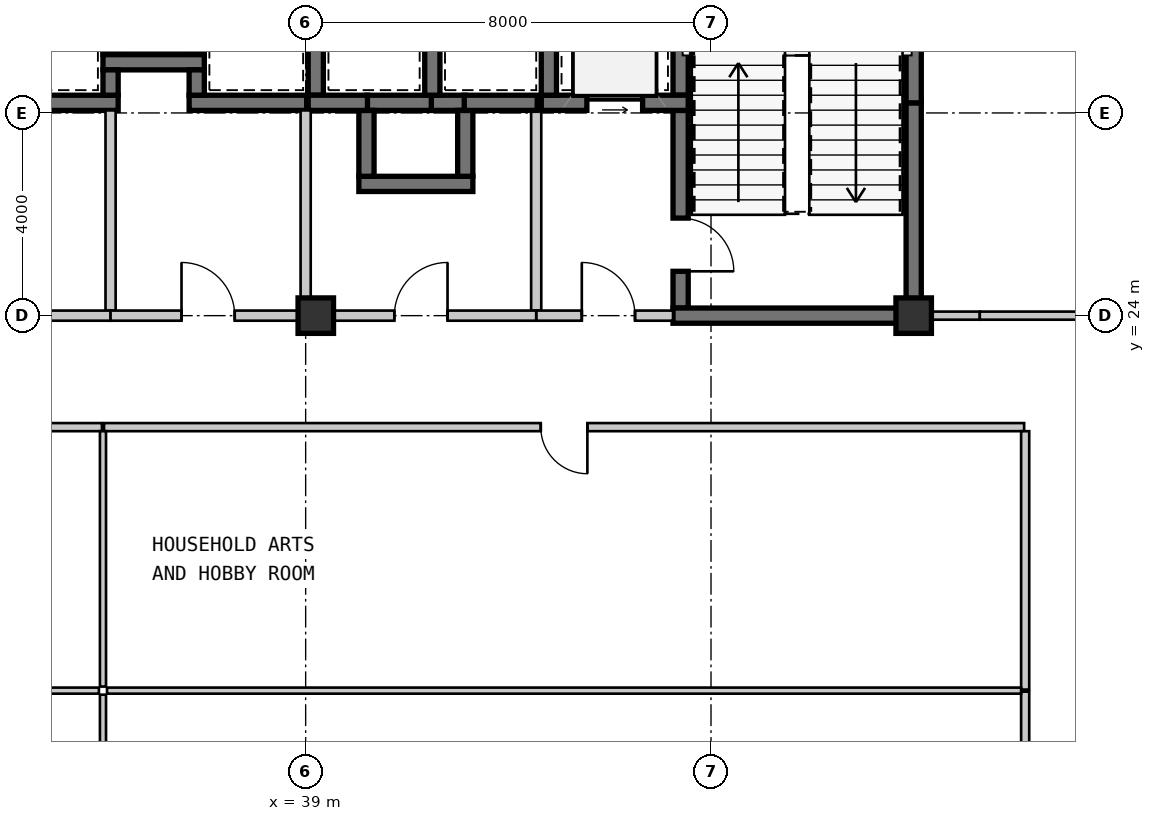
"""IFC4 building model, lengths in metres.
Left out: names, types, materials, properties, quantities, classifications, styles, units other than length and angle.
Written with IfcOpenShell. Run it as: python <this file> out.ifc"""

import sys

from ifc_helpers import new_model, si_unit, direction, frame, frame_2d, origin, origin_2d, place, context, subcontext, project, spatial, rectangle, extrude, source, transform, mapped, element, fill, save


model = new_model("IFC4")
c1 = context("Model", 3, precision=1e-05, world=origin(), true_north=direction((0.0, 1.0)))
c2 = subcontext(c1, "Body", "Model", "MODEL_VIEW")
j1 = project(units=[si_unit("LENGTHUNIT", "METRE"), si_unit("PLANEANGLEUNIT", "RADIAN")], contexts=[c1])
p1 = place(None, origin())
s1 = spatial("IfcSite", under=j1, at=p1, CompositionType="ELEMENT")
p2 = place(p1, origin())
s2 = spatial("IfcBuilding", under=s1, at=p2, CompositionType="ELEMENT")
p3 = place(p2, frame((0.0, 0.0, 74.55)))
s3 = spatial("IfcBuildingStorey", under=s2, at=p3, CompositionType="ELEMENT", Elevation=74.55)
m1 = source(origin(), c2, "Body", "SweptSolid", [
    extrude(rectangle(XDim=0.7, YDim=0.7, at=origin_2d()), origin(), (0.0, 0.0, 1.0), 3.15),
])
for number, where, z_axis, x_axis in (
    (1, (39.2, 24.0, 0.0), (0.0, 0.0, 1.0), (1.0, 0.0, 0.0)),
    (2, (51.0, 24.0, 0.0), (0.0, 0.0, 1.0), (1.0, 0.0, 0.0)),
):
    element("IfcColumn", number, at=place(p3, frame(where, z_axis=z_axis, x_axis=x_axis)), inside=s3, PredefinedType="COLUMN", context=c2, shape_type="MappedRepresentation", body=[
        mapped(m1, transform((0.0, 0.0, 0.0), scale=1.0)),
    ])
m2 = source(origin(), c2, "Body", "SweptSolid", [
    extrude(rectangle(XDim=4.05, YDim=0.3, at=frame_2d((2.025, 0.0))), origin(), (0.0, 0.0, 1.0), 2.93),
])
p4 = place(p3, frame((51.0, 24.15, 0.0), z_axis=(0.0, 0.0, 1.0), x_axis=(0.0, 1.0, 0.0)))
e3 = element("IfcWall", 3, at=p4, inside=s3, PredefinedType="SHEAR", context=c2, shape_type="MappedRepresentation", body=[
    mapped(m2, transform((0.0, 0.0, 0.0), scale=1.0)),
])
m3 = source(origin(), c2, "Body", "SweptSolid", [
    extrude(rectangle(XDim=3.65, YDim=0.3, at=frame_2d((1.825, 0.0))), origin(), (0.0, 0.0, 1.0), 2.93),
])
p5 = place(p3, frame((51.0, 28.2, 0.0), z_axis=(0.0, 0.0, 1.0), x_axis=(0.0, 1.0, 0.0)))
e4 = element("IfcWall", 4, at=p5, inside=s3, PredefinedType="SHEAR", context=c2, shape_type="MappedRepresentation", body=[
    mapped(m3, transform((0.0, 0.0, 0.0), scale=1.0)),
])
m4 = source(origin(), c2, "Body", "SweptSolid", [
    extrude(rectangle(XDim=3.5, YDim=0.3, at=frame_2d((1.75, 0.0))), origin(), (0.0, 0.0, 1.0), 2.93),
])
p6 = place(p3, frame((46.4, 31.85, 0.0), z_axis=(0.0, 0.0, 1.0), x_axis=(0.0, -1.0, 0.0)))
e5 = element("IfcWall", 5, at=p6, inside=s3, PredefinedType="SHEAR", context=c2, shape_type="MappedRepresentation", body=[
    mapped(m4, transform((0.0, 0.0, 0.0), scale=1.0)),
])
m5 = source(origin(), c2, "Body", "SweptSolid", [
    extrude(rectangle(XDim=3.9, YDim=0.3, at=frame_2d((1.95, 0.0))), origin(), (0.0, 0.0, 1.0), 2.93),
])
p7 = place(p3, frame((46.4, 28.05, 0.0), z_axis=(0.0, 0.0, 1.0), x_axis=(0.0, -1.0, 0.0)))
e6 = element("IfcWall", 6, at=p7, inside=s3, PredefinedType="SHEAR", context=c2, shape_type="MappedRepresentation", body=[
    mapped(m5, transform((0.0, 0.0, 0.0), scale=1.0)),
])
m6 = source(origin(), c2, "Body", "SweptSolid", [
    extrude(rectangle(XDim=1.05, YDim=2.1, at=frame_2d((0.525, 1.05))), frame((0.0, 0.16, 0.0), z_axis=(0.0, -1.0, 0.0), x_axis=(1.0, 0.0, 0.0)), (0.0, 0.0, 1.0), 0.32),
])
p8 = place(p7, frame((2.125, 0.0, 0.0)))
e7 = element("IfcOpeningElement", 7, at=p8, cuts=e6, PredefinedType="OPENING", context=c2, shape_type="MappedRepresentation", body=[
    mapped(m6, transform((0.0, 0.0, 0.0), scale=1.0)),
])
m7 = source(origin(), c2, "Body", "SweptSolid", [
    extrude(rectangle(XDim=4.9, YDim=0.3, at=frame_2d((2.45, 0.0))), origin(), (0.0, 0.0, 1.0), 2.93),
])
p9 = place(p3, frame((46.25, 24.0, 0.0), z_axis=(0.0, 0.0, 1.0), x_axis=(1.0, 0.0, 0.0)))
e8 = element("IfcWall", 8, at=p9, inside=s3, PredefinedType="SHEAR", context=c2, shape_type="MappedRepresentation", body=[
    mapped(m7, transform((0.0, 0.0, 0.0), scale=1.0)),
])
m8 = source(origin(), c2, "Body", "SweptSolid", [
    extrude(rectangle(XDim=2.9, YDim=0.3, at=frame_2d((1.45, 0.0))), origin(), (0.0, 0.0, 1.0), 2.93),
])
p10 = place(p3, frame((43.65, 28.2, 0.0), z_axis=(0.0, 0.0, 1.0), x_axis=(1.0, 0.0, 0.0)))
e9 = element("IfcWall", 9, at=p10, inside=s3, PredefinedType="SHEAR", context=c2, shape_type="MappedRepresentation", body=[
    mapped(m8, transform((0.0, 0.0, 0.0), scale=1.0)),
])
m9 = source(origin(), c2, "Body", "SweptSolid", [
    extrude(rectangle(XDim=1.1, YDim=2.15, at=frame_2d((0.55, 1.075))), frame((0.0, 0.16, 0.0), z_axis=(0.0, -1.0, 0.0), x_axis=(1.0, 0.0, 0.0)), (0.0, 0.0, 1.0), 0.32),
])
p11 = place(p10, frame((0.9, 0.0, 0.0)))
e10 = element("IfcOpeningElement", 10, at=p11, cuts=e9, PredefinedType="OPENING", context=c2, shape_type="MappedRepresentation", body=[
    mapped(m9, transform((0.0, 0.0, 0.0), scale=1.0)),
])
p12 = place(p3, frame((43.8, 31.85, 0.0), z_axis=(0.0, 0.0, 1.0), x_axis=(0.0, -1.0, 0.0)))
e11 = element("IfcWall", 11, at=p12, inside=s3, PredefinedType="SHEAR", context=c2, shape_type="MappedRepresentation", body=[
    mapped(m4, transform((0.0, 0.0, 0.0), scale=1.0)),
])
m10 = source(origin(), c2, "Body", "SweptSolid", [
    extrude(rectangle(XDim=3.95, YDim=0.2, at=frame_2d((1.975, 0.0))), origin(), (0.0, 0.0, 1.0), 2.93),
])
p13 = place(p3, frame((43.55, 28.05, 0.0), z_axis=(0.0, 0.0, 1.0), x_axis=(0.0, -1.0, 0.0)))
e12 = element("IfcWall", 12, at=p13, inside=s3, PredefinedType="SOLIDWALL", context=c2, shape_type="MappedRepresentation", body=[
    mapped(m10, transform((0.0, 0.0, 0.0), scale=1.0)),
])
m11 = source(origin(), c2, "Body", "SweptSolid", [
    extrude(rectangle(XDim=2.7, YDim=0.2, at=frame_2d((1.35, 0.0))), origin(), (0.0, 0.0, 1.0), 2.397),
])
p14 = place(p3, frame((43.55, 24.0, 0.0), z_axis=(0.0, 0.0, 1.0), x_axis=(1.0, 0.0, 0.0)))
e13 = element("IfcWall", 13, at=p14, inside=s3, PredefinedType="SOLIDWALL", context=c2, shape_type="MappedRepresentation", body=[
    mapped(m11, transform((0.0, 0.0, 0.0), scale=1.0)),
])
m12 = source(origin(), c2, "Body", "SweptSolid", [
    extrude(rectangle(XDim=1.05, YDim=2.1, at=frame_2d((0.525, 1.05))), frame((0.0, 0.11, 0.0), z_axis=(0.0, -1.0, 0.0), x_axis=(1.0, 0.0, 0.0)), (0.0, 0.0, 1.0), 0.22),
])
p15 = place(p14, frame((0.9, 0.0, 0.0)))
e14 = element("IfcOpeningElement", 14, at=p15, cuts=e13, PredefinedType="OPENING", context=c2, shape_type="MappedRepresentation", body=[
    mapped(m12, transform((0.0, 0.0, 0.0), scale=1.0)),
])
m13 = source(origin(), c2, "Body", "SweptSolid", [
    extrude(rectangle(XDim=1.2, YDim=0.3, at=frame_2d((0.6, 0.0))), origin(), (0.0, 0.0, 1.0), 2.93),
])
for number, where, z_axis, x_axis in (
    (15, (35.15, 30.35, 0.0), (0.0, 0.0, 1.0), (0.0, -1.0, 0.0)),
    (16, (36.85, 29.15, 0.0), (0.0, 0.0, 1.0), (0.0, 1.0, 0.0)),
):
    element("IfcWall", number, at=place(p3, frame(where, z_axis=z_axis, x_axis=x_axis)), inside=s3, PredefinedType="SHEAR", context=c2, shape_type="MappedRepresentation", body=[
        mapped(m13, transform((0.0, 0.0, 0.0), scale=1.0)),
    ])
m14 = source(origin(), c2, "Body", "SweptSolid", [
    extrude(rectangle(XDim=2.0, YDim=0.3, at=frame_2d((1.0, 0.0))), origin(), (0.0, 0.0, 1.0), 2.93),
])
p16 = place(p3, frame((35.0, 29.0, 0.0), z_axis=(0.0, 0.0, 1.0), x_axis=(1.0, 0.0, 0.0)))
e17 = element("IfcWall", 17, at=p16, inside=s3, PredefinedType="SHEAR", context=c2, shape_type="MappedRepresentation", body=[
    mapped(m14, transform((0.0, 0.0, 0.0), scale=1.0)),
])
m15 = source(origin(), c2, "Body", "SweptSolid", [
    extrude(rectangle(XDim=1.32, YDim=0.3, at=frame_2d((0.66, 0.0))), origin(), (0.0, 0.0, 1.0), 2.93),
])
p17 = place(p3, frame((41.52, 28.2, 0.0), z_axis=(0.0, 0.0, 1.0), x_axis=(-1.0, 0.0, 0.0)))
e18 = element("IfcWall", 18, at=p17, inside=s3, PredefinedType="SHEAR", context=c2, shape_type="MappedRepresentation", body=[
    mapped(m15, transform((0.0, 0.0, 0.0), scale=1.0)),
])
m16 = source(origin(), c2, "Body", "SweptSolid", [
    extrude(rectangle(XDim=0.67, YDim=0.3, at=frame_2d((0.335, 0.0))), origin(), (0.0, 0.0, 1.0), 2.93),
])
p18 = place(p3, frame((42.15, 28.2, 0.0), z_axis=(0.0, 0.0, 1.0), x_axis=(-1.0, 0.0, 0.0)))
e19 = element("IfcWall", 19, at=p18, inside=s3, PredefinedType="SHEAR", context=c2, shape_type="MappedRepresentation", body=[
    mapped(m16, transform((0.0, 0.0, 0.0), scale=1.0)),
])
m17 = source(origin(), c2, "Body", "SweptSolid", [
    extrude(rectangle(XDim=2.25, YDim=0.3, at=frame_2d((1.125, 0.0))), origin(), (0.0, 0.0, 1.0), 2.93),
])
p19 = place(p3, frame((40.05, 26.6, 0.0), z_axis=(0.0, 0.0, 1.0), x_axis=(1.0, 0.0, 0.0)))
e20 = element("IfcWall", 20, at=p19, inside=s3, PredefinedType="SHEAR", context=c2, shape_type="MappedRepresentation", body=[
    mapped(m17, transform((0.0, 0.0, 0.0), scale=1.0)),
])
m18 = source(origin(), c2, "Body", "SweptSolid", [
    extrude(rectangle(XDim=1.3, YDim=0.3, at=frame_2d((0.65, 0.0))), origin(), (0.0, 0.0, 1.0), 2.93),
])
for number, where, z_axis, x_axis in (
    (21, (40.2, 28.05, 0.0), (0.0, 0.0, 1.0), (0.0, -1.0, 0.0)),
    (22, (42.15, 26.75, 0.0), (0.0, 0.0, 1.0), (0.0, 1.0, 0.0)),
):
    element("IfcWall", number, at=place(p3, frame(where, z_axis=z_axis, x_axis=x_axis)), inside=s3, PredefinedType="SHEAR", context=c2, shape_type="MappedRepresentation", body=[
        mapped(m18, transform((0.0, 0.0, 0.0), scale=1.0)),
    ])
m19 = source(origin(), c2, "Body", "SweptSolid", [
    extrude(rectangle(XDim=2.6, YDim=0.3, at=frame_2d((1.3, 0.0))), origin(), (0.0, 0.0, 1.0), 2.93),
])
p20 = place(p3, frame((32.7, 28.2, 0.0), z_axis=(0.0, 0.0, 1.0), x_axis=(1.0, 0.0, 0.0)))
e23 = element("IfcWall", 23, at=p20, inside=s3, PredefinedType="SHEAR", context=c2, shape_type="MappedRepresentation", body=[
    mapped(m19, transform((0.0, 0.0, 0.0), scale=1.0)),
])
m20 = source(origin(), c2, "Body", "SweptSolid", [
    extrude(rectangle(XDim=0.5, YDim=0.3, at=frame_2d((0.25, 0.0))), origin(), (0.0, 0.0, 1.0), 2.93),
])
p21 = place(p3, frame((35.15, 28.35, 0.0), z_axis=(0.0, 0.0, 1.0), x_axis=(0.0, 1.0, 0.0)))
e24 = element("IfcWall", 24, at=p21, inside=s3, PredefinedType="SHEAR", context=c2, shape_type="MappedRepresentation", body=[
    mapped(m20, transform((0.0, 0.0, 0.0), scale=1.0)),
])
p22 = place(p3, frame((39.2, 28.35, 0.0), z_axis=(0.0, 0.0, 1.0), x_axis=(0.0, 1.0, 0.0)))
e25 = element("IfcWall", 25, at=p22, inside=s3, PredefinedType="SHEAR", context=c2, shape_type="MappedRepresentation", body=[
    mapped(m4, transform((0.0, 0.0, 0.0), scale=1.0)),
])
m21 = source(origin(), c2, "Body", "SweptSolid", [
    extrude(rectangle(XDim=2.32, YDim=0.3, at=frame_2d((1.16, 0.0))), origin(), (0.0, 0.0, 1.0), 2.93),
])
p23 = place(p3, frame((36.7, 28.2, 0.0), z_axis=(0.0, 0.0, 1.0), x_axis=(1.0, 0.0, 0.0)))
e26 = element("IfcWall", 26, at=p23, inside=s3, PredefinedType="SHEAR", context=c2, shape_type="MappedRepresentation", body=[
    mapped(m21, transform((0.0, 0.0, 0.0), scale=1.0)),
])
p24 = place(p3, frame((36.85, 28.85, 0.0), z_axis=(0.0, 0.0, 1.0), x_axis=(0.0, -1.0, 0.0)))
e27 = element("IfcWall", 27, at=p24, inside=s3, PredefinedType="SHEAR", context=c2, shape_type="MappedRepresentation", body=[
    mapped(m20, transform((0.0, 0.0, 0.0), scale=1.0)),
])
p25 = place(p3, frame((41.5, 28.35, 0.0), z_axis=(0.0, 0.0, 1.0), x_axis=(0.0, 1.0, 0.0)))
e28 = element("IfcWall", 28, at=p25, inside=s3, PredefinedType="SHEAR", context=c2, shape_type="MappedRepresentation", body=[
    mapped(m4, transform((0.0, 0.0, 0.0), scale=1.0)),
])
m22 = source(origin(), c2, "Body", "SweptSolid", [
    extrude(rectangle(XDim=1.17, YDim=0.3, at=frame_2d((0.585, 0.0))), origin(), (0.0, 0.0, 1.0), 2.93),
])
p26 = place(p3, frame((39.05, 28.2, 0.0), z_axis=(0.0, 0.0, 1.0), x_axis=(1.0, 0.0, 0.0)))
e29 = element("IfcWall", 29, at=p26, inside=s3, PredefinedType="SHEAR", context=c2, shape_type="MappedRepresentation", body=[
    mapped(m22, transform((0.0, 0.0, 0.0), scale=1.0)),
])
m23 = source(origin(), c2, "Body", "SweptSolid", [
    extrude(rectangle(XDim=1.44, YDim=0.3, at=frame_2d((0.72, 0.0))), origin(), (0.0, 0.0, 1.0), 2.93),
])
p27 = place(p3, frame((42.13, 28.2, 0.0), z_axis=(0.0, 0.0, 1.0), x_axis=(1.0, 0.0, 0.0)))
e30 = element("IfcWall", 30, at=p27, inside=s3, PredefinedType="SHEAR", context=c2, shape_type="MappedRepresentation", body=[
    mapped(m23, transform((0.0, 0.0, 0.0), scale=1.0)),
])
p28 = place(p3, frame((35.15, 28.05, 0.0), z_axis=(0.0, 0.0, 1.0), x_axis=(0.0, -1.0, 0.0)))
e31 = element("IfcWall", 31, at=p28, inside=s3, PredefinedType="SOLIDWALL", context=c2, shape_type="MappedRepresentation", body=[
    mapped(m10, transform((0.0, 0.0, 0.0), scale=1.0)),
])
m24 = source(origin(), c2, "Body", "SweptSolid", [
    extrude(rectangle(XDim=4.35, YDim=0.2, at=frame_2d((2.175, 0.0))), origin(), (0.0, 0.0, 1.0), 2.47),
])
p29 = place(p3, frame((35.15, 24.0, 0.0), z_axis=(0.0, 0.0, 1.0), x_axis=(-1.0, 0.0, 0.0)))
e32 = element("IfcWall", 32, at=p29, inside=s3, PredefinedType="SOLIDWALL", context=c2, shape_type="MappedRepresentation", body=[
    mapped(m24, transform((0.0, 0.0, 0.0), scale=1.0)),
])
p30 = place(p29, frame((1.65, 0.0, 0.0)))
e33 = element("IfcOpeningElement", 33, at=p30, cuts=e32, PredefinedType="OPENING", context=c2, shape_type="MappedRepresentation", body=[
    mapped(m12, transform((0.0, 0.0, 0.0), scale=1.0)),
])
p31 = place(p3, frame((39.0, 28.05, 0.0), z_axis=(0.0, 0.0, 1.0), x_axis=(0.0, -1.0, 0.0)))
e34 = element("IfcWall", 34, at=p31, inside=s3, PredefinedType="SOLIDWALL", context=c2, shape_type="MappedRepresentation", body=[
    mapped(m10, transform((0.0, 0.0, 0.0), scale=1.0)),
])
m25 = source(origin(), c2, "Body", "SweptSolid", [
    extrude(rectangle(XDim=3.85, YDim=0.2, at=frame_2d((1.925, 0.0))), origin(), (0.0, 0.0, 1.0), 2.47),
])
p32 = place(p3, frame((39.0, 24.0, 0.0), z_axis=(0.0, 0.0, 1.0), x_axis=(-1.0, 0.0, 0.0)))
e35 = element("IfcWall", 35, at=p32, inside=s3, PredefinedType="SOLIDWALL", context=c2, shape_type="MappedRepresentation", body=[
    mapped(m25, transform((0.0, 0.0, 0.0), scale=1.0)),
])
p33 = place(p32, frame((1.4, 0.0, 0.0)))
e36 = element("IfcOpeningElement", 36, at=p33, cuts=e35, PredefinedType="OPENING", context=c2, shape_type="MappedRepresentation", body=[
    mapped(m12, transform((0.0, 0.0, 0.0), scale=1.0)),
])
m26 = source(origin(), c2, "Body", "SweptSolid", [
    extrude(rectangle(XDim=4.55, YDim=0.2, at=frame_2d((2.275, 0.0))), origin(), (0.0, 0.0, 1.0), 2.397),
])
p34 = place(p3, frame((43.55, 24.0, 0.0), z_axis=(0.0, 0.0, 1.0), x_axis=(-1.0, 0.0, 0.0)))
e37 = element("IfcWall", 37, at=p34, inside=s3, PredefinedType="SOLIDWALL", context=c2, shape_type="MappedRepresentation", body=[
    mapped(m26, transform((0.0, 0.0, 0.0), scale=1.0)),
])
p35 = place(p34, frame((1.75, 0.0, 0.0)))
e38 = element("IfcOpeningElement", 38, at=p35, cuts=e37, PredefinedType="OPENING", context=c2, shape_type="MappedRepresentation", body=[
    mapped(m12, transform((0.0, 0.0, 0.0), scale=1.0)),
])
m27 = source(origin(), c2, "Body", "SweptSolid", [
    extrude(rectangle(XDim=18.159, YDim=0.16, at=frame_2d((9.08, 0.0))), origin(), (0.0, 0.0, 1.0), 2.93),
])
p36 = place(p3, frame((34.98, 21.8, 0.0), z_axis=(0.0, 0.0, 1.0), x_axis=(-1.0, 0.0, 0.0)))
e39 = element("IfcWall", 39, at=p36, inside=s3, PredefinedType="PARTITIONING", context=c2, shape_type="MappedRepresentation", body=[
    mapped(m27, transform((0.0, 0.0, 0.0), scale=1.0)),
])
m28 = source(origin(), c2, "Body", "SweptSolid", [
    extrude(rectangle(XDim=0.92, YDim=2.1, at=frame_2d((0.46, 1.05))), frame((0.0, 0.09, 0.0), z_axis=(0.0, -1.0, 0.0), x_axis=(1.0, 0.0, 0.0)), (0.0, 0.0, 1.0), 0.18),
])
p37 = place(p36, frame((8.62, 0.0, 0.0)))
e40 = element("IfcOpeningElement", 40, at=p37, cuts=e39, PredefinedType="OPENING", context=c2, shape_type="MappedRepresentation", body=[
    mapped(m28, transform((0.0, 0.0, 0.0), scale=1.0)),
])
m29 = source(origin(), c2, "Body", "SweptSolid", [
    extrude(rectangle(XDim=5.16, YDim=0.16, at=frame_2d((2.58, 0.0))), origin(), (0.0, 0.0, 1.0), 2.93),
])
p38 = place(p3, frame((53.2, 11.42, 0.0), z_axis=(0.0, 0.0, 1.0), x_axis=(0.0, 1.0, 0.0)))
e41 = element("IfcWall", 41, at=p38, inside=s3, PredefinedType="PARTITIONING", context=c2, shape_type="MappedRepresentation", body=[
    mapped(m29, transform((0.0, 0.0, 0.0), scale=1.0)),
])
p39 = place(p3, frame((53.18, 21.8, 0.0), z_axis=(0.0, 0.0, 1.0), x_axis=(-1.0, 0.0, 0.0)))
e42 = element("IfcWall", 42, at=p39, inside=s3, PredefinedType="PARTITIONING", context=c2, shape_type="MappedRepresentation", body=[
    mapped(m27, transform((0.0, 0.0, 0.0), scale=1.0)),
])
p40 = place(p39, frame((8.62, 0.0, 0.0)))
e43 = element("IfcOpeningElement", 43, at=p40, cuts=e42, PredefinedType="OPENING", context=c2, shape_type="MappedRepresentation", body=[
    mapped(m28, transform((0.0, 0.0, 0.0), scale=1.0)),
])
m30 = source(origin(), c2, "Body", "SweptSolid", [
    extrude(rectangle(XDim=5.1, YDim=0.16, at=frame_2d((2.55, 0.0))), origin(), (0.0, 0.0, 1.0), 2.93),
])
p41 = place(p3, frame((53.2, 16.62, 0.0), z_axis=(0.0, 0.0, 1.0), x_axis=(0.0, 1.0, 0.0)))
e44 = element("IfcWall", 44, at=p41, inside=s3, PredefinedType="PARTITIONING", context=c2, shape_type="MappedRepresentation", body=[
    mapped(m30, transform((0.0, 0.0, 0.0), scale=1.0)),
])
m31 = source(origin(), c2, "Body", "SweptSolid", [
    extrude(rectangle(XDim=1.155, YDim=0.16, at=frame_2d((0.577, 0.0))), origin(), (0.0, 0.0, 1.0), 2.328),
])
p42 = place(p3, frame((51.15, 24.0, 0.0), z_axis=(0.0, 0.0, 1.0), x_axis=(1.0, 0.0, 0.0)))
e45 = element("IfcWall", 45, at=p42, inside=s3, PredefinedType="PARTITIONING", context=c2, shape_type="MappedRepresentation", body=[
    mapped(m31, transform((0.0, 0.0, 0.0), scale=1.0)),
])
m32 = source(origin(), c2, "Body", "SweptSolid", [
    extrude(rectangle(XDim=3.016, YDim=0.16, at=frame_2d((1.508, 0.0))), origin(), (0.0, 0.0, 1.0), 2.93),
])
p43 = place(p3, frame((52.304, 24.0, 0.0), z_axis=(0.0, 0.0, 1.0), x_axis=(1.0, 0.0, 0.0)))
e46 = element("IfcWall", 46, at=p43, inside=s3, PredefinedType="PARTITIONING", context=c2, shape_type="MappedRepresentation", body=[
    mapped(m32, transform((0.0, 0.0, 0.0), scale=1.0)),
])
m33 = source(origin(), c2, "Body", "SweptSolid", [
    extrude(rectangle(XDim=18.04, YDim=0.12, at=frame_2d((9.02, 0.0))), origin(), (0.0, 0.0, 1.0), 2.93),
])
p44 = place(p3, frame((16.88, 16.6, 0.0), z_axis=(0.0, 0.0, 1.0), x_axis=(1.0, 0.0, 0.0)))
e47 = element("IfcWall", 47, at=p44, inside=s3, PredefinedType="PARTITIONING", context=c2, shape_type="MappedRepresentation", body=[
    mapped(m33, transform((0.0, 0.0, 0.0), scale=1.0)),
])
m34 = source(origin(), c2, "Body", "SweptSolid", [
    extrude(rectangle(XDim=5.04, YDim=0.12, at=frame_2d((2.52, 0.0))), origin(), (0.0, 0.0, 1.0), 2.93),
])
for number, where, z_axis, x_axis in (
    (48, (35.0, 16.52, 0.0), (0.0, 0.0, 1.0), (0.0, -1.0, 0.0)),
    (49, (35.0, 21.72, 0.0), (0.0, 0.0, 1.0), (0.0, -1.0, 0.0)),
):
    element("IfcWall", number, at=place(p3, frame(where, z_axis=z_axis, x_axis=x_axis)), inside=s3, PredefinedType="PARTITIONING", context=c2, shape_type="MappedRepresentation", body=[
        mapped(m34, transform((0.0, 0.0, 0.0), scale=1.0)),
    ])
p45 = place(p3, frame((35.08, 16.6, 0.0), z_axis=(0.0, 0.0, 1.0), x_axis=(1.0, 0.0, 0.0)))
e50 = element("IfcWall", 50, at=p45, inside=s3, PredefinedType="PARTITIONING", context=c2, shape_type="MappedRepresentation", body=[
    mapped(m33, transform((0.0, 0.0, 0.0), scale=1.0)),
])
m35 = source(origin(), c2, "Body", "SweptSolid", [
    extrude(rectangle(XDim=1.05, YDim=2.1, at=frame_2d((0.525, 1.05))), frame((0.0, 0.025, 0.0), z_axis=(0.0, -1.0, 0.0), x_axis=(1.0, 0.0, 0.0)), (0.0, 0.0, 1.0), 0.05),
])
p46 = place(p8, origin())
e51 = element("IfcDoor", 51, at=p46, inside=s3, OperationType="SINGLE_SWING_RIGHT", PredefinedType="DOOR", context=c2, shape_type="MappedRepresentation", body=[
    mapped(m35, transform((0.0, 0.0, 0.0), scale=1.0)),
])
fill(e7, e51)
m36 = source(origin(), c2, "Body", "SweptSolid", [
    extrude(rectangle(XDim=1.1, YDim=2.15, at=frame_2d((0.55, 1.075))), frame((0.0, 0.025, 0.0), z_axis=(0.0, -1.0, 0.0), x_axis=(1.0, 0.0, 0.0)), (0.0, 0.0, 1.0), 0.05),
])
p47 = place(p11, origin())
e52 = element("IfcDoor", 52, at=p47, inside=s3, OperationType="SLIDING_TO_LEFT", PredefinedType="DOOR", context=c2, shape_type="MappedRepresentation", body=[
    mapped(m36, transform((0.0, 0.0, 0.0), scale=1.0)),
])
fill(e10, e52)
p48 = place(p15, origin())
e53 = element("IfcDoor", 53, at=p48, inside=s3, OperationType="SINGLE_SWING_LEFT", PredefinedType="DOOR", context=c2, shape_type="MappedRepresentation", body=[
    mapped(m35, transform((0.0, 0.0, 0.0), scale=1.0)),
])
fill(e14, e53)
p49 = place(p33, frame((1.05, 0.0, 0.0), z_axis=(0.0, 0.0, 1.0), x_axis=(-1.0, 0.0, 0.0)))
e54 = element("IfcDoor", 54, at=p49, inside=s3, OperationType="SINGLE_SWING_LEFT", PredefinedType="DOOR", context=c2, shape_type="MappedRepresentation", body=[
    mapped(m35, transform((0.0, 0.0, 0.0), scale=1.0)),
])
fill(e36, e54)
p50 = place(p35, frame((1.05, 0.0, 0.0), z_axis=(0.0, 0.0, 1.0), x_axis=(-1.0, 0.0, 0.0)))
e55 = element("IfcDoor", 55, at=p50, inside=s3, OperationType="SINGLE_SWING_RIGHT", PredefinedType="DOOR", context=c2, shape_type="MappedRepresentation", body=[
    mapped(m35, transform((0.0, 0.0, 0.0), scale=1.0)),
])
fill(e38, e55)
m37 = source(origin(), c2, "Body", "SweptSolid", [
    extrude(rectangle(XDim=0.92, YDim=2.1, at=frame_2d((0.46, 1.05))), frame((0.0, 0.025, 0.0), z_axis=(0.0, -1.0, 0.0), x_axis=(1.0, 0.0, 0.0)), (0.0, 0.0, 1.0), 0.05),
])
p51 = place(p40, origin())
e56 = element("IfcDoor", 56, at=p51, inside=s3, OperationType="SINGLE_SWING_LEFT", PredefinedType="DOOR", context=c2, shape_type="MappedRepresentation", body=[
    mapped(m37, transform((0.0, 0.0, 0.0), scale=1.0)),
])
fill(e43, e56)
save(model, sys.argv[1])
